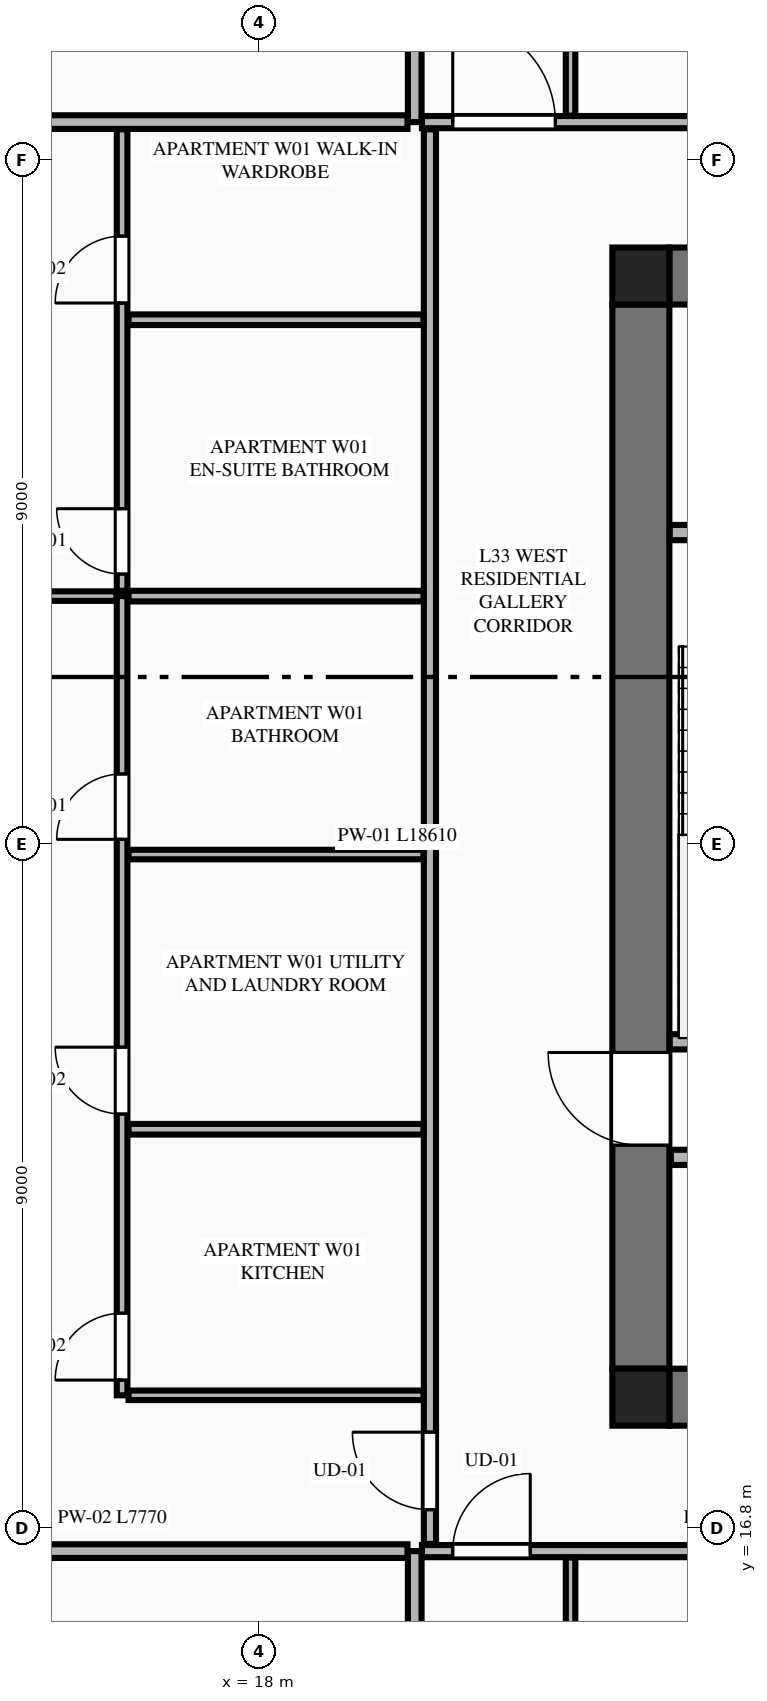
"""IFC4 building model, lengths in metres.
Left out: names, types, materials, properties, quantities, classifications, styles, units other than length and angle.
Written with IfcOpenShell. Run it as: python <this file> out.ifc"""

import sys

from ifc_helpers import new_model, si_unit, direction, frame, frame_2d, origin, origin_2d, place, context, subcontext, project, spatial, rectangle, extrude, element, fill, save


model = new_model("IFC4")
c1 = context("Model", 3, precision=1e-05, world=origin(), true_north=direction((0.0, 1.0)))
c2 = subcontext(c1, "Body", "Model", "MODEL_VIEW")
j1 = project(units=[si_unit("LENGTHUNIT", "METRE"), si_unit("PLANEANGLEUNIT", "RADIAN")], contexts=[c1])
p1 = place(None, origin())
s1 = spatial("IfcSite", under=j1, at=p1, CompositionType="ELEMENT")
p2 = place(p1, origin())
s2 = spatial("IfcBuilding", under=s1, at=p2, CompositionType="ELEMENT")
p3 = place(p2, frame((0.0, 0.0, 126.8)))
s3 = spatial("IfcBuildingStorey", under=s2, at=p3, CompositionType="ELEMENT", Elevation=126.8)
for number, where, z_axis, x_axis in (
    (1, (23.025, 18.525, 0.0), (0.0, 0.0, 1.0), (1.0, 0.0, 0.0)),
    (2, (23.025, 33.275, 0.0), (0.0, 0.0, 1.0), (1.0, 0.0, 0.0)),
):
    element("IfcColumn", number, at=place(p3, frame(where, z_axis=z_axis, x_axis=x_axis)), inside=s3, PredefinedType="COLUMN", context=c2, shape_type="SweptSolid", body=[
        extrude(rectangle(XDim=0.75, YDim=0.75, at=origin_2d()), origin(), (0.0, 0.0, 1.0), 3.55),
    ])
for number, where, z_axis, x_axis in (
    (3, (23.4, 18.525, 0.0), (0.0, 0.0, 1.0), (1.0, 0.0, 0.0)),
    (4, (23.4, 33.275, 0.0), (0.0, 0.0, 1.0), (1.0, 0.0, 0.0)),
):
    element("IfcWall", number, at=place(p3, frame(where, z_axis=z_axis, x_axis=x_axis)), inside=s3, PredefinedType="SHEAR", context=c2, shape_type="SweptSolid", body=[
        extrude(rectangle(XDim=18.0, YDim=0.75, at=frame_2d((9.0, 0.0))), origin(), (0.0, 0.0, 1.0), 3.34),
    ])
p4 = place(p3, frame((23.025, 18.9, 0.0), z_axis=(0.0, 0.0, 1.0), x_axis=(0.0, 1.0, 0.0)))
e5 = element("IfcWall", 5, at=p4, inside=s3, PredefinedType="SHEAR", context=c2, shape_type="SweptSolid", body=[
    extrude(rectangle(XDim=14.0, YDim=0.75, at=frame_2d((7.0, 0.0))), origin(), (0.0, 0.0, 1.0), 3.34),
])
p5 = place(p4, frame((2.94, 0.0, 0.0)))
e6 = element("IfcOpeningElement", 6, at=p5, cuts=e5, PredefinedType="OPENING", context=c2, shape_type="SweptSolid", body=[
    extrude(rectangle(XDim=1.22, YDim=2.25, at=frame_2d((0.61, 1.125))), frame((0.0, 0.385, 0.0), z_axis=(0.0, -1.0, 0.0), x_axis=(1.0, 0.0, 0.0)), (0.0, 0.0, 1.0), 0.77),
])
p6 = place(p3, frame((23.405, 23.2, 0.0), z_axis=(0.0, 0.0, 1.0), x_axis=(1.0, 0.0, 0.0)))
e7 = element("IfcWall", 7, at=p6, inside=s3, PredefinedType="PLUMBINGWALL", context=c2, shape_type="SweptSolid", body=[
    extrude(rectangle(XDim=3.27, YDim=0.2, at=frame_2d((1.635, 0.0))), origin(), (0.0, 0.0, 1.0), 3.34),
])
p7 = place(p3, frame((23.405, 29.9, 0.0), z_axis=(0.0, 0.0, 1.0), x_axis=(1.0, 0.0, 0.0)))
e8 = element("IfcWall", 8, at=p7, inside=s3, PredefinedType="PLUMBINGWALL", context=c2, shape_type="SweptSolid", body=[
    extrude(rectangle(XDim=3.27, YDim=0.2, at=frame_2d((1.635, 0.0))), origin(), (0.0, 0.0, 1.0), 3.34),
])
p8 = place(p7, frame((1.85, 0.0, 0.0)))
e9 = element("IfcOpeningElement", 9, at=p8, cuts=e8, PredefinedType="OPENING", context=c2, shape_type="SweptSolid", body=[
    extrude(rectangle(XDim=0.85, YDim=2.05, at=frame_2d((0.425, 1.025))), frame((0.0, 0.11, 0.0), z_axis=(0.0, -1.0, 0.0), x_axis=(1.0, 0.0, 0.0)), (0.0, 0.0, 1.0), 0.22),
])
p9 = place(p3, frame((23.42, 21.68, 0.0), z_axis=(0.0, 0.0, 1.0), x_axis=(1.0, 0.0, 0.0)))
e10 = element("IfcWall", 10, at=p9, inside=s3, PredefinedType="PLUMBINGWALL", context=c2, shape_type="SweptSolid", body=[
    extrude(rectangle(XDim=17.96, YDim=0.2, at=frame_2d((8.98, 0.0))), origin(), (0.0, 0.0, 1.0), 3.34),
])
p10 = place(p9, frame((11.6, 0.0, 0.0)))
e11 = element("IfcOpeningElement", 11, at=p10, cuts=e10, PredefinedType="OPENING", context=c2, shape_type="SweptSolid", body=[
    extrude(rectangle(XDim=1.1, YDim=2.2, at=frame_2d((0.55, 1.1))), frame((0.0, 0.11, 0.0), z_axis=(0.0, -1.0, 0.0), x_axis=(1.0, 0.0, 0.0)), (0.0, 0.0, 1.0), 0.22),
])
p11 = place(p9, frame((0.41, 0.0, 0.0)))
e12 = element("IfcOpeningElement", 12, at=p11, cuts=e10, PredefinedType="OPENING", context=c2, shape_type="SweptSolid", body=[
    extrude(rectangle(XDim=0.85, YDim=2.05, at=frame_2d((0.425, 1.025))), frame((0.0, 0.11, 0.0), z_axis=(0.0, -1.0, 0.0), x_axis=(1.0, 0.0, 0.0)), (0.0, 0.0, 1.0), 0.22),
])
p12 = place(p9, frame((6.03, 0.0, 0.0)))
e13 = element("IfcOpeningElement", 13, at=p12, cuts=e10, PredefinedType="OPENING", context=c2, shape_type="SweptSolid", body=[
    extrude(rectangle(XDim=0.85, YDim=2.05, at=frame_2d((0.425, 1.025))), frame((0.0, 0.11, 0.0), z_axis=(0.0, -1.0, 0.0), x_axis=(1.0, 0.0, 0.0)), (0.0, 0.0, 1.0), 0.22),
])
p13 = place(p9, frame((13.78, 0.0, 0.0)))
e14 = element("IfcOpeningElement", 14, at=p13, cuts=e10, PredefinedType="OPENING", context=c2, shape_type="SweptSolid", body=[
    extrude(rectangle(XDim=0.85, YDim=2.05, at=frame_2d((0.425, 1.025))), frame((0.0, 0.11, 0.0), z_axis=(0.0, -1.0, 0.0), x_axis=(1.0, 0.0, 0.0)), (0.0, 0.0, 1.0), 0.22),
])
p14 = place(p3, frame((20.05, 4.105, 0.0), z_axis=(0.0, 0.0, 1.0), x_axis=(0.0, 1.0, 0.0)))
e15 = element("IfcWall", 15, at=p14, inside=s3, PredefinedType="PARTITIONING", context=c2, shape_type="SweptSolid", body=[
    extrude(rectangle(XDim=12.395, YDim=0.18, at=frame_2d((6.198, 0.0))), origin(), (0.0, 0.0, 1.0), 3.34),
])
p15 = place(p3, frame((20.145, 16.5, 0.0), z_axis=(0.0, 0.0, 1.0), x_axis=(1.0, 0.0, 0.0)))
e16 = element("IfcWall", 16, at=p15, inside=s3, PredefinedType="PARTITIONING", context=c2, shape_type="SweptSolid", body=[
    extrude(rectangle(XDim=8.328, YDim=0.16, at=frame_2d((4.164, 0.0))), origin(), (0.0, 0.0, 1.0), 3.34),
])
p16 = place(p15, frame((0.405, 0.0, 0.0)))
e17 = element("IfcOpeningElement", 17, at=p16, cuts=e16, PredefinedType="OPENING", context=c2, shape_type="SweptSolid", body=[
    extrude(rectangle(XDim=1.02, YDim=2.25, at=frame_2d((0.51, 1.125))), frame((0.0, 0.09, 0.0), z_axis=(0.0, -1.0, 0.0), x_axis=(1.0, 0.0, 0.0)), (0.0, 0.0, 1.0), 0.18),
])
p17 = place(p3, frame((22.1, 10.16, 0.0), z_axis=(0.0, 0.0, 1.0), x_axis=(0.0, 1.0, 0.0)))
e18 = element("IfcWall", 18, at=p17, inside=s3, PredefinedType="PARTITIONING", context=c2, shape_type="SweptSolid", body=[
    extrude(rectangle(XDim=6.255, YDim=0.125, at=frame_2d((3.127, 0.0))), origin(), (0.0, 0.0, 1.0), 2.722),
])
p18 = place(p3, frame((20.05, 35.3, 0.0), z_axis=(0.0, 0.0, 1.0), x_axis=(0.0, 1.0, 0.0)))
e19 = element("IfcWall", 19, at=p18, inside=s3, PredefinedType="PARTITIONING", context=c2, shape_type="SweptSolid", body=[
    extrude(rectangle(XDim=12.195, YDim=0.18, at=frame_2d((6.098, 0.0))), origin(), (0.0, 0.0, 1.0), 3.34),
])
p19 = place(p3, frame((20.145, 35.3, 0.0), z_axis=(0.0, 0.0, 1.0), x_axis=(1.0, 0.0, 0.0)))
e20 = element("IfcWall", 20, at=p19, inside=s3, PredefinedType="PARTITIONING", context=c2, shape_type="SweptSolid", body=[
    extrude(rectangle(XDim=24.51, YDim=0.16, at=frame_2d((12.255, 0.0))), origin(), (0.0, 0.0, 1.0), 3.34),
])
p20 = place(p19, frame((0.405, 0.0, 0.0)))
e21 = element("IfcOpeningElement", 21, at=p20, cuts=e20, PredefinedType="OPENING", context=c2, shape_type="SweptSolid", body=[
    extrude(rectangle(XDim=1.35, YDim=2.35, at=frame_2d((0.675, 1.175))), frame((0.0, 0.09, 0.0), z_axis=(0.0, -1.0, 0.0), x_axis=(1.0, 0.0, 0.0)), (0.0, 0.0, 1.0), 0.18),
])
p21 = place(p3, frame((22.1, 35.385, 0.0), z_axis=(0.0, 0.0, 1.0), x_axis=(0.0, 1.0, 0.0)))
e22 = element("IfcWall", 22, at=p21, inside=s3, PredefinedType="PARTITIONING", context=c2, shape_type="SweptSolid", body=[
    extrude(rectangle(XDim=5.664, YDim=0.125, at=frame_2d((2.832, 0.0))), origin(), (0.0, 0.0, 1.0), 2.722),
])
p22 = place(p3, frame((12.185, 16.5, 0.0), z_axis=(0.0, 0.0, 1.0), x_axis=(1.0, 0.0, 0.0)))
e23 = element("IfcWall", 23, at=p22, inside=s3, PredefinedType="PARTITIONING", context=c2, shape_type="SweptSolid", body=[
    extrude(rectangle(XDim=7.77, YDim=0.18, at=frame_2d((3.885, 0.0))), origin(), (0.0, 0.0, 1.0), 3.34),
])
p23 = place(p3, frame((12.286, 35.3, 0.0), z_axis=(0.0, 0.0, 1.0), x_axis=(1.0, 0.0, 0.0)))
e24 = element("IfcWall", 24, at=p23, inside=s3, PredefinedType="PARTITIONING", context=c2, shape_type="SweptSolid", body=[
    extrude(rectangle(XDim=7.669, YDim=0.18, at=frame_2d((3.834, 0.0))), origin(), (0.0, 0.0, 1.0), 3.34),
])
p24 = place(p3, frame((20.25, 16.595, 0.0), z_axis=(0.0, 0.0, 1.0), x_axis=(0.0, 1.0, 0.0)))
e25 = element("IfcWall", 25, at=p24, inside=s3, PredefinedType="PARTITIONING", context=c2, shape_type="SweptSolid", body=[
    extrude(rectangle(XDim=18.61, YDim=0.16, at=frame_2d((9.305, 0.0))), origin(), (0.0, 0.0, 1.0), 3.34),
])
p25 = place(p24, frame((0.45, 0.0, 0.0)))
e26 = element("IfcOpeningElement", 26, at=p25, cuts=e25, PredefinedType="OPENING", context=c2, shape_type="SweptSolid", body=[
    extrude(rectangle(XDim=1.02, YDim=2.25, at=frame_2d((0.51, 1.125))), frame((0.0, 0.09, 0.0), z_axis=(0.0, -1.0, 0.0), x_axis=(1.0, 0.0, 0.0)), (0.0, 0.0, 1.0), 0.18),
])
p26 = place(p3, frame((16.285, 18.55, 0.0), z_axis=(0.0, 0.0, 1.0), x_axis=(1.0, 0.0, 0.0)))
e27 = element("IfcWall", 27, at=p26, inside=s3, PredefinedType="PARTITIONING", context=c2, shape_type="SweptSolid", body=[
    extrude(rectangle(XDim=3.88, YDim=0.125, at=frame_2d((1.94, 0.0))), origin(), (0.0, 0.0, 1.0), 2.722),
])
p27 = place(p3, frame((16.2, 18.55, 0.0), z_axis=(0.0, 0.0, 1.0), x_axis=(0.0, 1.0, 0.0)))
e28 = element("IfcWall", 28, at=p27, inside=s3, PredefinedType="PLUMBINGWALL", context=c2, shape_type="SweptSolid", body=[
    extrude(rectangle(XDim=10.514, YDim=0.14, at=frame_2d((5.257, 0.0))), origin(), (0.0, 0.0, 1.0), 3.34),
])
p28 = place(p27, frame((0.2, 0.0, 0.0)))
e29 = element("IfcOpeningElement", 29, at=p28, cuts=e28, PredefinedType="OPENING", context=c2, shape_type="SweptSolid", body=[
    extrude(rectangle(XDim=0.88, YDim=2.15, at=frame_2d((0.44, 1.075))), frame((0.0, 0.08, 0.0), z_axis=(0.0, -1.0, 0.0), x_axis=(1.0, 0.0, 0.0)), (0.0, 0.0, 1.0), 0.16),
])
p29 = place(p27, frame((3.7, 0.0, 0.0)))
e30 = element("IfcOpeningElement", 30, at=p29, cuts=e28, PredefinedType="OPENING", context=c2, shape_type="SweptSolid", body=[
    extrude(rectangle(XDim=0.88, YDim=2.15, at=frame_2d((0.44, 1.075))), frame((0.0, 0.08, 0.0), z_axis=(0.0, -1.0, 0.0), x_axis=(1.0, 0.0, 0.0)), (0.0, 0.0, 1.0), 0.16),
])
p30 = place(p27, frame((7.314, 0.0, 0.0)))
e31 = element("IfcOpeningElement", 31, at=p30, cuts=e28, PredefinedType="OPENING", context=c2, shape_type="SweptSolid", body=[
    extrude(rectangle(XDim=0.86, YDim=2.1, at=frame_2d((0.43, 1.05))), frame((0.0, 0.08, 0.0), z_axis=(0.0, -1.0, 0.0), x_axis=(1.0, 0.0, 0.0)), (0.0, 0.0, 1.0), 0.16),
])
p31 = place(p3, frame((16.2, 29.134, 0.0), z_axis=(0.0, 0.0, 1.0), x_axis=(0.0, 1.0, 0.0)))
e32 = element("IfcWall", 32, at=p31, inside=s3, PredefinedType="PLUMBINGWALL", context=c2, shape_type="SweptSolid", body=[
    extrude(rectangle(XDim=6.071, YDim=0.14, at=frame_2d((3.036, 0.0))), origin(), (0.0, 0.0, 1.0), 3.34),
])
p32 = place(p31, frame((0.22, 0.0, 0.0)))
e33 = element("IfcOpeningElement", 33, at=p32, cuts=e32, PredefinedType="OPENING", context=c2, shape_type="SweptSolid", body=[
    extrude(rectangle(XDim=0.86, YDim=2.1, at=frame_2d((0.43, 1.05))), frame((0.0, 0.08, 0.0), z_axis=(0.0, -1.0, 0.0), x_axis=(1.0, 0.0, 0.0)), (0.0, 0.0, 1.0), 0.16),
])
p33 = place(p31, frame((3.786, 0.0, 0.0)))
e34 = element("IfcOpeningElement", 34, at=p33, cuts=e32, PredefinedType="OPENING", context=c2, shape_type="SweptSolid", body=[
    extrude(rectangle(XDim=0.88, YDim=2.15, at=frame_2d((0.44, 1.075))), frame((0.0, 0.08, 0.0), z_axis=(0.0, -1.0, 0.0), x_axis=(1.0, 0.0, 0.0)), (0.0, 0.0, 1.0), 0.16),
])
p34 = place(p3, frame((16.285, 29.064, 0.0), z_axis=(0.0, 0.0, 1.0), x_axis=(1.0, 0.0, 0.0)))
e35 = element("IfcWall", 35, at=p34, inside=s3, PredefinedType="PLUMBINGWALL", context=c2, shape_type="SweptSolid", body=[
    extrude(rectangle(XDim=3.88, YDim=0.14, at=frame_2d((1.94, 0.0))), origin(), (0.0, 0.0, 1.0), 3.34),
])
p35 = place(p3, frame((9.116, 29.064, 0.0), z_axis=(0.0, 0.0, 1.0), x_axis=(1.0, 0.0, 0.0)))
e36 = element("IfcWall", 36, at=p35, inside=s3, PredefinedType="PARTITIONING", context=c2, shape_type="SweptSolid", body=[
    extrude(rectangle(XDim=7.009, YDim=0.125, at=frame_2d((3.504, 0.0))), origin(), (0.0, 0.0, 1.0), 3.34),
])
p36 = place(p35, frame((0.35, 0.0, 0.0)))
e37 = element("IfcOpeningElement", 37, at=p36, cuts=e36, PredefinedType="OPENING", context=c2, shape_type="SweptSolid", body=[
    extrude(rectangle(XDim=0.92, YDim=2.15, at=frame_2d((0.46, 1.075))), frame((0.0, 0.073, 0.0), z_axis=(0.0, -1.0, 0.0), x_axis=(1.0, 0.0, 0.0)), (0.0, 0.0, 1.0), 0.145),
])
p37 = place(p3, frame((16.285, 22.05, 0.0), z_axis=(0.0, 0.0, 1.0), x_axis=(1.0, 0.0, 0.0)))
e38 = element("IfcWall", 38, at=p37, inside=s3, PredefinedType="PLUMBINGWALL", context=c2, shape_type="SweptSolid", body=[
    extrude(rectangle(XDim=3.88, YDim=0.14, at=frame_2d((1.94, 0.0))), origin(), (0.0, 0.0, 1.0), 3.34),
])
p38 = place(p3, frame((16.285, 25.664, 0.0), z_axis=(0.0, 0.0, 1.0), x_axis=(1.0, 0.0, 0.0)))
e39 = element("IfcWall", 39, at=p38, inside=s3, PredefinedType="PARTITIONING", context=c2, shape_type="SweptSolid", body=[
    extrude(rectangle(XDim=3.88, YDim=0.125, at=frame_2d((1.94, 0.0))), origin(), (0.0, 0.0, 1.0), 3.34),
])
p39 = place(p3, frame((16.285, 32.7, 0.0), z_axis=(0.0, 0.0, 1.0), x_axis=(1.0, 0.0, 0.0)))
e40 = element("IfcWall", 40, at=p39, inside=s3, PredefinedType="PLUMBINGWALL", context=c2, shape_type="SweptSolid", body=[
    extrude(rectangle(XDim=3.88, YDim=0.14, at=frame_2d((1.94, 0.0))), origin(), (0.0, 0.0, 1.0), 3.34),
])
p40 = place(p5, origin())
e41 = element("IfcDoor", 41, at=p40, inside=s3, OperationType="SINGLE_SWING_RIGHT", PredefinedType="DOOR", context=c2, shape_type="SweptSolid", body=[
    extrude(rectangle(XDim=1.22, YDim=2.25, at=frame_2d((0.61, 1.125))), frame((0.0, 0.025, 0.0), z_axis=(0.0, -1.0, 0.0), x_axis=(1.0, 0.0, 0.0)), (0.0, 0.0, 1.0), 0.05),
])
fill(e6, e41)
p41 = place(p16, origin())
e42 = element("IfcDoor", 42, at=p41, inside=s3, OperationType="SINGLE_SWING_RIGHT", PredefinedType="DOOR", context=c2, shape_type="SweptSolid", body=[
    extrude(rectangle(XDim=1.02, YDim=2.25, at=frame_2d((0.51, 1.125))), frame((0.0, 0.025, 0.0), z_axis=(0.0, -1.0, 0.0), x_axis=(1.0, 0.0, 0.0)), (0.0, 0.0, 1.0), 0.05),
])
fill(e17, e42)
p42 = place(p20, origin())
e43 = element("IfcDoor", 43, at=p42, inside=s3, OperationType="SINGLE_SWING_LEFT", PredefinedType="DOOR", context=c2, shape_type="SweptSolid", body=[
    extrude(rectangle(XDim=1.35, YDim=2.35, at=frame_2d((0.675, 1.175))), frame((0.0, 0.025, 0.0), z_axis=(0.0, -1.0, 0.0), x_axis=(1.0, 0.0, 0.0)), (0.0, 0.0, 1.0), 0.05),
])
fill(e21, e43)
p43 = place(p28, origin())
e44 = element("IfcDoor", 44, at=p43, inside=s3, OperationType="SINGLE_SWING_LEFT", PredefinedType="DOOR", context=c2, shape_type="SweptSolid", body=[
    extrude(rectangle(XDim=0.88, YDim=2.15, at=frame_2d((0.44, 1.075))), frame((0.0, 0.025, 0.0), z_axis=(0.0, -1.0, 0.0), x_axis=(1.0, 0.0, 0.0)), (0.0, 0.0, 1.0), 0.05),
])
fill(e29, e44)
p44 = place(p29, origin())
e45 = element("IfcDoor", 45, at=p44, inside=s3, OperationType="SINGLE_SWING_RIGHT", PredefinedType="DOOR", context=c2, shape_type="SweptSolid", body=[
    extrude(rectangle(XDim=0.88, YDim=2.15, at=frame_2d((0.44, 1.075))), frame((0.0, 0.025, 0.0), z_axis=(0.0, -1.0, 0.0), x_axis=(1.0, 0.0, 0.0)), (0.0, 0.0, 1.0), 0.05),
])
fill(e30, e45)
p45 = place(p30, origin())
e46 = element("IfcDoor", 46, at=p45, inside=s3, OperationType="SINGLE_SWING_LEFT", PredefinedType="DOOR", context=c2, shape_type="SweptSolid", body=[
    extrude(rectangle(XDim=0.86, YDim=2.1, at=frame_2d((0.43, 1.05))), frame((0.0, 0.025, 0.0), z_axis=(0.0, -1.0, 0.0), x_axis=(1.0, 0.0, 0.0)), (0.0, 0.0, 1.0), 0.05),
])
fill(e31, e46)
p46 = place(p32, origin())
e47 = element("IfcDoor", 47, at=p46, inside=s3, OperationType="SINGLE_SWING_RIGHT", PredefinedType="DOOR", context=c2, shape_type="SweptSolid", body=[
    extrude(rectangle(XDim=0.86, YDim=2.1, at=frame_2d((0.43, 1.05))), frame((0.0, 0.025, 0.0), z_axis=(0.0, -1.0, 0.0), x_axis=(1.0, 0.0, 0.0)), (0.0, 0.0, 1.0), 0.05),
])
fill(e33, e47)
p47 = place(p33, origin())
e48 = element("IfcDoor", 48, at=p47, inside=s3, OperationType="SINGLE_SWING_LEFT", PredefinedType="DOOR", context=c2, shape_type="SweptSolid", body=[
    extrude(rectangle(XDim=0.88, YDim=2.15, at=frame_2d((0.44, 1.075))), frame((0.0, 0.025, 0.0), z_axis=(0.0, -1.0, 0.0), x_axis=(1.0, 0.0, 0.0)), (0.0, 0.0, 1.0), 0.05),
])
fill(e34, e48)
p48 = place(p25, origin())
e49 = element("IfcDoor", 49, at=p48, inside=s3, OperationType="SINGLE_SWING_RIGHT", PredefinedType="DOOR", context=c2, shape_type="SweptSolid", body=[
    extrude(rectangle(XDim=1.02, YDim=2.25, at=frame_2d((0.51, 1.125))), frame((0.0, 0.025, 0.0), z_axis=(0.0, -1.0, 0.0), x_axis=(1.0, 0.0, 0.0)), (0.0, 0.0, 1.0), 0.05),
])
fill(e26, e49)
save(model, sys.argv[1])
